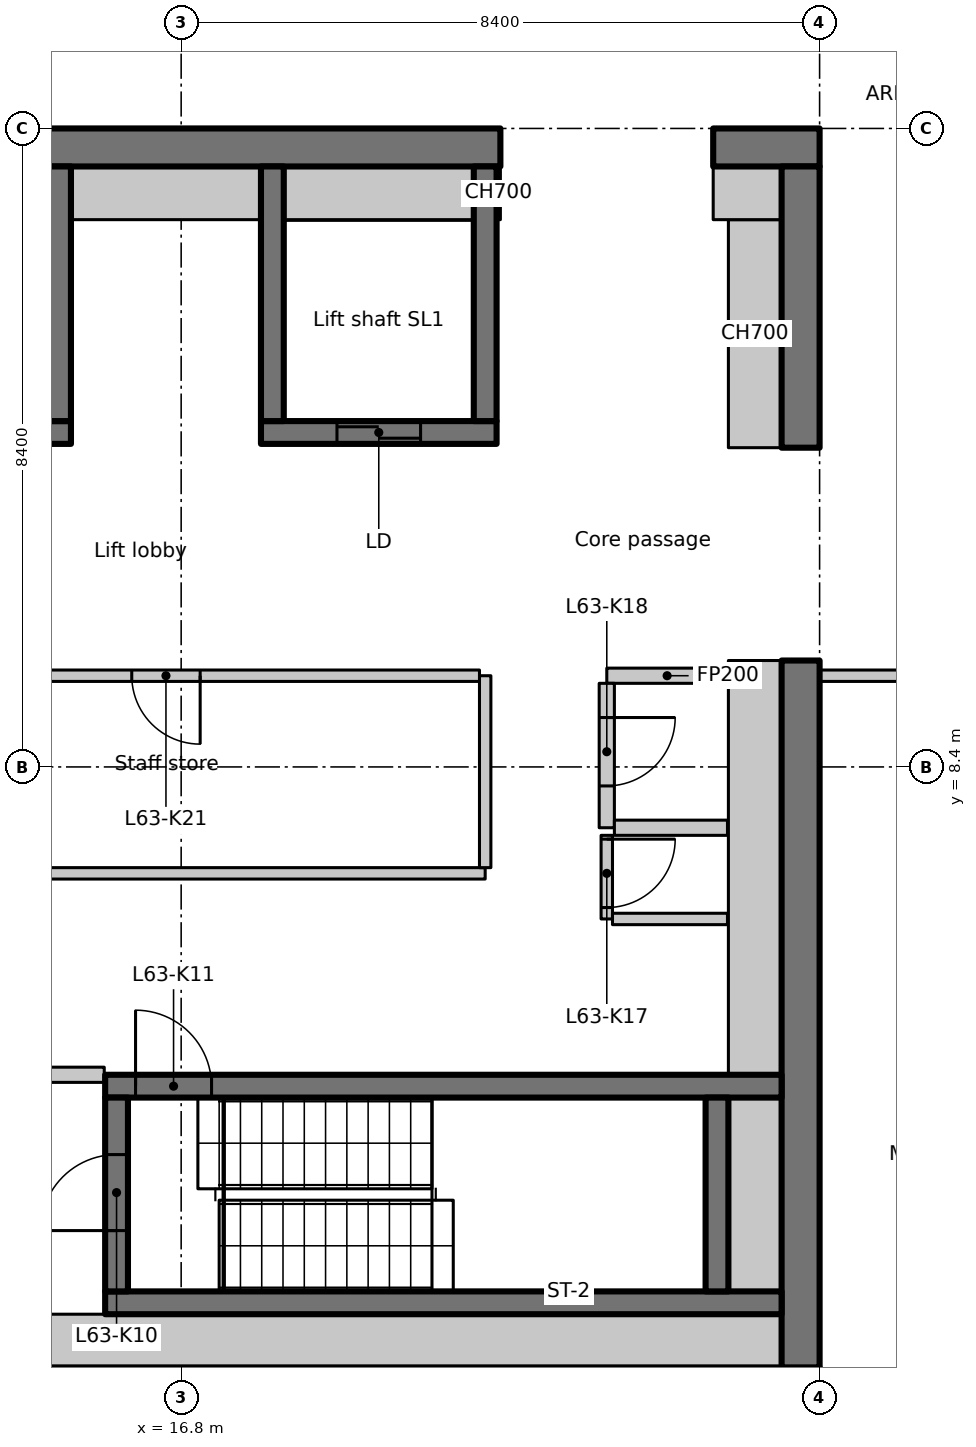
"""IFC4 building model, lengths in metres.
Left out: names, types, materials, properties, quantities, classifications, styles, units other than length and angle.
Written with IfcOpenShell. Run it as: python <this file> out.ifc"""

import sys

from ifc_helpers import new_model, si_unit, direction, frame, frame_2d, origin, place, context, subcontext, project, spatial, rectangle, extrude, element, fill, save


model = new_model("IFC4")
c1 = context("Model", 3, precision=1e-05, world=origin(), true_north=direction((0.0, 1.0)))
c2 = subcontext(c1, "Body", "Model", "MODEL_VIEW")
j1 = project(units=[si_unit("LENGTHUNIT", "METRE"), si_unit("PLANEANGLEUNIT", "RADIAN")], contexts=[c1])
p1 = place(None, origin())
s1 = spatial("IfcSite", under=j1, at=p1, CompositionType="ELEMENT")
p2 = place(p1, origin())
s2 = spatial("IfcBuilding", under=s1, at=p2, CompositionType="ELEMENT")
p3 = place(p2, frame((0.0, 0.0, 248.1)))
s3 = spatial("IfcBuildingStorey", under=s2, at=p3, CompositionType="ELEMENT", Elevation=248.1)
p4 = place(p3, frame((-1.1, 16.55, 0.0), z_axis=(0.0, 0.0, 1.0), x_axis=(1.0, 0.0, 0.0)))
e1 = element("IfcWall", 1, at=p4, inside=s3, PredefinedType="SHEAR", context=c2, shape_type="SweptSolid", body=[
    extrude(rectangle(XDim=22.1, YDim=0.5, at=frame_2d((11.05, 0.0))), origin(), (0.0, 0.0, 1.0), 3.35),
])
p5 = place(p4, frame((3.15, 0.0, 0.0)))
e2 = element("IfcOpeningElement", 2, at=p5, cuts=e1, PredefinedType="OPENING", context=c2, shape_type="SweptSolid", body=[
    extrude(rectangle(XDim=1.1, YDim=2.3, at=frame_2d((0.55, 1.15))), frame((0.0, 0.26, 0.0), z_axis=(0.0, -1.0, 0.0), x_axis=(1.0, 0.0, 0.0)), (0.0, 0.0, 1.0), 0.52),
])
p6 = place(p3, frame((23.8, 16.55, 0.0), z_axis=(0.0, 0.0, 1.0), x_axis=(1.0, 0.0, 0.0)))
e3 = element("IfcWall", 3, at=p6, inside=s3, PredefinedType="SHEAR", context=c2, shape_type="SweptSolid", body=[
    extrude(rectangle(XDim=1.4, YDim=0.5, at=frame_2d((0.7, 0.0))), origin(), (0.0, 0.0, 1.0), 3.35),
])
p7 = place(p3, frame((24.95, 0.5, 0.0), z_axis=(0.0, 0.0, 1.0), x_axis=(0.0, 1.0, 0.0)))
e4 = element("IfcWall", 4, at=p7, inside=s3, PredefinedType="SHEAR", context=c2, shape_type="SweptSolid", body=[
    extrude(rectangle(XDim=9.3, YDim=0.5, at=frame_2d((4.65, 0.0))), origin(), (0.0, 0.0, 1.0), 3.35),
])
p8 = place(p3, frame((24.95, 12.6, 0.0), z_axis=(0.0, 0.0, 1.0), x_axis=(0.0, 1.0, 0.0)))
e5 = element("IfcWall", 5, at=p8, inside=s3, PredefinedType="SHEAR", context=c2, shape_type="SweptSolid", body=[
    extrude(rectangle(XDim=3.7, YDim=0.5, at=frame_2d((1.85, 0.0))), origin(), (0.0, 0.0, 1.0), 3.35),
])
p9 = place(p3, frame((24.35, 12.6, 0.0), z_axis=(0.0, 0.0, 1.0), x_axis=(0.0, 1.0, 0.0)))
e6 = element("IfcWall", 6, at=p9, inside=s3, PredefinedType="PARTITIONING", context=c2, shape_type="SweptSolid", body=[
    extrude(rectangle(XDim=3.0, YDim=0.7, at=frame_2d((1.5, 0.0))), origin(), (0.0, 0.0, 1.0), 3.35),
])
p10 = place(p3, frame((23.8, 15.95, 0.0), z_axis=(0.0, 0.0, 1.0), x_axis=(1.0, 0.0, 0.0)))
e7 = element("IfcWall", 7, at=p10, inside=s3, PredefinedType="PARTITIONING", context=c2, shape_type="SweptSolid", body=[
    extrude(rectangle(XDim=0.9, YDim=0.7, at=frame_2d((0.45, 0.0))), origin(), (0.0, 0.0, 1.0), 3.35),
])
p11 = place(p3, frame((0.5, 12.8, 0.0), z_axis=(0.0, 0.0, 1.0), x_axis=(1.0, 0.0, 0.0)))
e8 = element("IfcWall", 8, at=p11, inside=s3, PredefinedType="SHEAR", context=c2, shape_type="SweptSolid", body=[
    extrude(rectangle(XDim=14.85, YDim=0.3, at=frame_2d((7.425, 0.0))), origin(), (0.0, 0.0, 1.0), 3.35),
])
p12 = place(p11, frame((4.35, 0.0, 0.0)))
e9 = element("IfcOpeningElement", 9, at=p12, cuts=e8, PredefinedType="OPENING", context=c2, shape_type="SweptSolid", body=[
    extrude(rectangle(XDim=1.1, YDim=2.3, at=frame_2d((0.55, 1.15))), frame((0.0, 0.16, 0.0), z_axis=(0.0, -1.0, 0.0), x_axis=(1.0, 0.0, 0.0)), (0.0, 0.0, 1.0), 0.32),
])
p13 = place(p11, frame((7.15, 0.0, 0.0)))
e10 = element("IfcOpeningElement", 10, at=p13, cuts=e8, PredefinedType="OPENING", context=c2, shape_type="SweptSolid", body=[
    extrude(rectangle(XDim=1.1, YDim=2.3, at=frame_2d((0.55, 1.15))), frame((0.0, 0.16, 0.0), z_axis=(0.0, -1.0, 0.0), x_axis=(1.0, 0.0, 0.0)), (0.0, 0.0, 1.0), 0.32),
])
p14 = place(p11, frame((9.95, 0.0, 0.0)))
e11 = element("IfcOpeningElement", 11, at=p14, cuts=e8, PredefinedType="OPENING", context=c2, shape_type="SweptSolid", body=[
    extrude(rectangle(XDim=1.1, YDim=2.3, at=frame_2d((0.55, 1.15))), frame((0.0, 0.16, 0.0), z_axis=(0.0, -1.0, 0.0), x_axis=(1.0, 0.0, 0.0)), (0.0, 0.0, 1.0), 0.32),
])
p15 = place(p11, frame((12.75, 0.0, 0.0)))
e12 = element("IfcOpeningElement", 12, at=p15, cuts=e8, PredefinedType="OPENING", context=c2, shape_type="SweptSolid", body=[
    extrude(rectangle(XDim=1.1, YDim=2.3, at=frame_2d((0.55, 1.15))), frame((0.0, 0.16, 0.0), z_axis=(0.0, -1.0, 0.0), x_axis=(1.0, 0.0, 0.0)), (0.0, 0.0, 1.0), 0.32),
])
p16 = place(p3, frame((15.2, 12.95, 0.0), z_axis=(0.0, 0.0, 1.0), x_axis=(0.0, 1.0, 0.0)))
e13 = element("IfcWall", 13, at=p16, inside=s3, PredefinedType="SHEAR", context=c2, shape_type="SweptSolid", body=[
    extrude(rectangle(XDim=3.35, YDim=0.3, at=frame_2d((1.675, 0.0))), origin(), (0.0, 0.0, 1.0), 3.35),
])
p17 = place(p3, frame((17.85, 12.8, 0.0), z_axis=(0.0, 0.0, 1.0), x_axis=(1.0, 0.0, 0.0)))
e14 = element("IfcWall", 14, at=p17, inside=s3, PredefinedType="SHEAR", context=c2, shape_type="SweptSolid", body=[
    extrude(rectangle(XDim=3.1, YDim=0.3, at=frame_2d((1.55, 0.0))), origin(), (0.0, 0.0, 1.0), 3.35),
])
p18 = place(p17, frame((1.0, 0.0, 0.0)))
e15 = element("IfcOpeningElement", 15, at=p18, cuts=e14, PredefinedType="OPENING", context=c2, shape_type="SweptSolid", body=[
    extrude(rectangle(XDim=1.1, YDim=2.3, at=frame_2d((0.55, 1.15))), frame((0.0, 0.16, 0.0), z_axis=(0.0, -1.0, 0.0), x_axis=(1.0, 0.0, 0.0)), (0.0, 0.0, 1.0), 0.32),
])
for number, where, z_axis, x_axis in (
    (16, (18.0, 12.95, 0.0), (0.0, 0.0, 1.0), (0.0, 1.0, 0.0)),
    (17, (20.8, 12.95, 0.0), (0.0, 0.0, 1.0), (0.0, 1.0, 0.0)),
):
    element("IfcWall", number, at=place(p3, frame(where, z_axis=z_axis, x_axis=x_axis)), inside=s3, PredefinedType="SHEAR", context=c2, shape_type="SweptSolid", body=[
        extrude(rectangle(XDim=3.35, YDim=0.3, at=frame_2d((1.675, 0.0))), origin(), (0.0, 0.0, 1.0), 3.35),
    ])
p19 = place(p3, frame((15.8, 1.35, 0.0), z_axis=(0.0, 0.0, 1.0), x_axis=(1.0, 0.0, 0.0)))
e18 = element("IfcWall", 18, at=p19, inside=s3, PredefinedType="SHEAR", context=c2, shape_type="SweptSolid", body=[
    extrude(rectangle(XDim=8.9, YDim=0.3, at=frame_2d((4.45, 0.0))), origin(), (0.0, 0.0, 1.0), 3.35),
])
p20 = place(p3, frame((15.8, 4.2, 0.0), z_axis=(0.0, 0.0, 1.0), x_axis=(1.0, 0.0, 0.0)))
e19 = element("IfcWall", 19, at=p20, inside=s3, PredefinedType="SHEAR", context=c2, shape_type="SweptSolid", body=[
    extrude(rectangle(XDim=8.9, YDim=0.3, at=frame_2d((4.45, 0.0))), origin(), (0.0, 0.0, 1.0), 3.35),
])
p21 = place(p20, frame((0.4, 0.0, 0.0)))
e20 = element("IfcOpeningElement", 20, at=p21, cuts=e19, PredefinedType="OPENING", context=c2, shape_type="SweptSolid", body=[
    extrude(rectangle(XDim=1.0, YDim=2.1, at=frame_2d((0.5, 1.05))), frame((0.0, 0.16, 0.0), z_axis=(0.0, -1.0, 0.0), x_axis=(1.0, 0.0, 0.0)), (0.0, 0.0, 1.0), 0.32),
])
p22 = place(p3, frame((15.95, 1.5, 0.0), z_axis=(0.0, 0.0, 1.0), x_axis=(0.0, 1.0, 0.0)))
e21 = element("IfcWall", 21, at=p22, inside=s3, PredefinedType="SHEAR", context=c2, shape_type="SweptSolid", body=[
    extrude(rectangle(XDim=2.55, YDim=0.3, at=frame_2d((1.275, 0.0))), origin(), (0.0, 0.0, 1.0), 3.35),
])
p23 = place(p22, frame((0.8, 0.0, 0.0)))
e22 = element("IfcOpeningElement", 22, at=p23, cuts=e21, PredefinedType="OPENING", context=c2, shape_type="SweptSolid", body=[
    extrude(rectangle(XDim=1.0, YDim=2.1, at=frame_2d((0.5, 1.05))), frame((0.0, 0.16, 0.0), z_axis=(0.0, -1.0, 0.0), x_axis=(1.0, 0.0, 0.0)), (0.0, 0.0, 1.0), 0.32),
])
p24 = place(p3, frame((23.85, 1.5, 0.0), z_axis=(0.0, 0.0, 1.0), x_axis=(0.0, 1.0, 0.0)))
e23 = element("IfcWall", 23, at=p24, inside=s3, PredefinedType="SHEAR", context=c2, shape_type="SweptSolid", body=[
    extrude(rectangle(XDim=2.55, YDim=0.3, at=frame_2d((1.275, 0.0))), origin(), (0.0, 0.0, 1.0), 3.35),
])
p25 = place(p3, frame((13.362, 4.35, 0.0), z_axis=(0.0, 0.0, 1.0), x_axis=(1.0, 0.0, 0.0)))
e24 = element("IfcWall", 24, at=p25, inside=s3, PredefinedType="PARTITIONING", context=c2, shape_type="SweptSolid", body=[
    extrude(rectangle(XDim=2.426, YDim=0.2, at=frame_2d((1.213, 0.0))), origin(), (0.0, 0.0, 1.0), 3.35),
])
p26 = place(p25, frame((0.638, 0.0, 0.0)))
e25 = element("IfcOpeningElement", 25, at=p26, cuts=e24, PredefinedType="OPENING", context=c2, shape_type="SweptSolid", body=[
    extrude(rectangle(XDim=1.0, YDim=2.1, at=frame_2d((0.5, 1.05))), frame((0.0, 0.11, 0.0), z_axis=(0.0, -1.0, 0.0), x_axis=(1.0, 0.0, 0.0)), (0.0, 0.0, 1.0), 0.22),
])
p27 = place(p3, frame((23.988, 9.6, 0.0), z_axis=(0.0, 0.0, 1.0), x_axis=(-1.0, 0.0, 0.0)))
e26 = element("IfcWall", 26, at=p27, inside=s3, PredefinedType="PARTITIONING", context=c2, shape_type="SweptSolid", body=[
    extrude(rectangle(XDim=1.588, YDim=0.2, at=frame_2d((0.794, 0.0))), origin(), (0.0, 0.0, 1.0), 3.35),
])
p28 = place(p3, frame((22.4, 9.5, 0.0), z_axis=(0.0, 0.0, 1.0), x_axis=(0.0, -1.0, 0.0)))
e27 = element("IfcWall", 27, at=p28, inside=s3, PredefinedType="PARTITIONING", context=c2, shape_type="SweptSolid", body=[
    extrude(rectangle(XDim=1.9, YDim=0.2, at=frame_2d((0.95, 0.0))), origin(), (0.0, 0.0, 1.0), 3.35),
])
p29 = place(p28, frame((0.45, 0.0, 0.0)))
e28 = element("IfcOpeningElement", 28, at=p29, cuts=e27, PredefinedType="OPENING", context=c2, shape_type="SweptSolid", body=[
    extrude(rectangle(XDim=0.9, YDim=2.1, at=frame_2d((0.45, 1.05))), frame((0.0, 0.11, 0.0), z_axis=(0.0, -1.0, 0.0), x_axis=(1.0, 0.0, 0.0)), (0.0, 0.0, 1.0), 0.22),
])
p30 = place(p3, frame((22.5, 7.6, 0.0), z_axis=(0.0, 0.0, 1.0), x_axis=(1.0, 0.0, 0.0)))
e29 = element("IfcWall", 29, at=p30, inside=s3, PredefinedType="PARTITIONING", context=c2, shape_type="SweptSolid", body=[
    extrude(rectangle(XDim=1.488, YDim=0.2, at=frame_2d((0.744, 0.0))), origin(), (0.0, 0.0, 1.0), 3.35),
])
p31 = place(p3, frame((12.5, 7.0, 0.0), z_axis=(0.0, 0.0, 1.0), x_axis=(1.0, 0.0, 0.0)))
e30 = element("IfcWall", 30, at=p31, inside=s3, PredefinedType="PARTITIONING", context=c2, shape_type="SweptSolid", body=[
    extrude(rectangle(XDim=8.3, YDim=0.15, at=frame_2d((4.15, 0.0))), origin(), (0.0, 0.0, 1.0), 3.35),
])
p32 = place(p3, frame((20.8, 7.075, 0.0), z_axis=(0.0, 0.0, 1.0), x_axis=(0.0, 1.0, 0.0)))
e31 = element("IfcWall", 31, at=p32, inside=s3, PredefinedType="PARTITIONING", context=c2, shape_type="SweptSolid", body=[
    extrude(rectangle(XDim=2.525, YDim=0.15, at=frame_2d((1.263, 0.0))), origin(), (0.0, 0.0, 1.0), 3.35),
])
p33 = place(p3, frame((20.725, 9.6, 0.0), z_axis=(0.0, 0.0, 1.0), x_axis=(-1.0, 0.0, 0.0)))
e32 = element("IfcWall", 32, at=p33, inside=s3, PredefinedType="PARTITIONING", context=c2, shape_type="SweptSolid", body=[
    extrude(rectangle(XDim=8.225, YDim=0.15, at=frame_2d((4.113, 0.0))), origin(), (0.0, 0.0, 1.0), 3.35),
])
p34 = place(p33, frame((3.675, 0.0, 0.0)))
e33 = element("IfcOpeningElement", 33, at=p34, cuts=e32, PredefinedType="OPENING", context=c2, shape_type="SweptSolid", body=[
    extrude(rectangle(XDim=0.9, YDim=2.1, at=frame_2d((0.45, 1.05))), frame((0.0, 0.085, 0.0), z_axis=(0.0, -1.0, 0.0), x_axis=(1.0, 0.0, 0.0)), (0.0, 0.0, 1.0), 0.17),
])
p35 = place(p3, frame((22.4, 7.5, 0.0), z_axis=(0.0, 0.0, 1.0), x_axis=(0.0, -1.0, 0.0)))
e34 = element("IfcWall", 34, at=p35, inside=s3, PredefinedType="PARTITIONING", context=c2, shape_type="SweptSolid", body=[
    extrude(rectangle(XDim=1.1, YDim=0.15, at=frame_2d((0.55, 0.0))), origin(), (0.0, 0.0, 1.0), 3.35),
])
p36 = place(p35, frame((0.05, 0.0, 0.0)))
e35 = element("IfcOpeningElement", 35, at=p36, cuts=e34, PredefinedType="OPENING", context=c2, shape_type="SweptSolid", body=[
    extrude(rectangle(XDim=0.9, YDim=2.1, at=frame_2d((0.45, 1.05))), frame((0.0, 0.085, 0.0), z_axis=(0.0, -1.0, 0.0), x_axis=(1.0, 0.0, 0.0)), (0.0, 0.0, 1.0), 0.17),
])
p37 = place(p3, frame((22.475, 6.4, 0.0), z_axis=(0.0, 0.0, 1.0), x_axis=(1.0, 0.0, 0.0)))
e36 = element("IfcWall", 36, at=p37, inside=s3, PredefinedType="PARTITIONING", context=c2, shape_type="SweptSolid", body=[
    extrude(rectangle(XDim=1.513, YDim=0.15, at=frame_2d((0.756, 0.0))), origin(), (0.0, 0.0, 1.0), 3.35),
])
for number, where, z_axis, x_axis in (
    (37, (15.35, 15.95, 0.0), (0.0, 0.0, 1.0), (1.0, 0.0, 0.0)),
    (38, (18.15, 15.95, 0.0), (0.0, 0.0, 1.0), (1.0, 0.0, 0.0)),
):
    element("IfcWall", number, at=place(p3, frame(where, z_axis=z_axis, x_axis=x_axis)), inside=s3, PredefinedType="PARTITIONING", context=c2, shape_type="SweptSolid", body=[
        extrude(rectangle(XDim=2.5, YDim=0.7, at=frame_2d((1.25, 0.0))), origin(), (0.0, 0.0, 1.0), 3.35),
    ])
p38 = place(p3, frame((20.95, 15.95, 0.0), z_axis=(0.0, 0.0, 1.0), x_axis=(1.0, 0.0, 0.0)))
e39 = element("IfcWall", 39, at=p38, inside=s3, PredefinedType="PARTITIONING", context=c2, shape_type="SweptSolid", body=[
    extrude(rectangle(XDim=0.05, YDim=0.7, at=frame_2d((0.025, 0.0))), origin(), (0.0, 0.0, 1.0), 3.35),
])
p39 = place(p3, frame((13.35, 0.85, 0.0), z_axis=(0.0, 0.0, 1.0), x_axis=(1.0, 0.0, 0.0)))
e40 = element("IfcWall", 40, at=p39, inside=s3, PredefinedType="PARTITIONING", context=c2, shape_type="SweptSolid", body=[
    extrude(rectangle(XDim=11.35, YDim=0.7, at=frame_2d((5.675, 0.0))), origin(), (0.0, 0.0, 1.0), 3.35),
])
p40 = place(p3, frame((24.35, 1.5, 0.0), z_axis=(0.0, 0.0, 1.0), x_axis=(0.0, 1.0, 0.0)))
e41 = element("IfcWall", 41, at=p40, inside=s3, PredefinedType="PARTITIONING", context=c2, shape_type="SweptSolid", body=[
    extrude(rectangle(XDim=2.55, YDim=0.7, at=frame_2d((1.275, 0.0))), origin(), (0.0, 0.0, 1.0), 3.35),
])
p41 = place(p3, frame((24.35, 4.35, 0.0), z_axis=(0.0, 0.0, 1.0), x_axis=(0.0, 1.0, 0.0)))
e42 = element("IfcWall", 42, at=p41, inside=s3, PredefinedType="PARTITIONING", context=c2, shape_type="SweptSolid", body=[
    extrude(rectangle(XDim=5.45, YDim=0.7, at=frame_2d((2.725, 0.0))), origin(), (0.0, 0.0, 1.0), 3.35),
])
p42 = place(p3, frame((29.4, 9.6, 0.0), z_axis=(0.0, 0.0, 1.0), x_axis=(-1.0, 0.0, 0.0)))
e43 = element("IfcWall", 43, at=p42, inside=s3, PredefinedType="PARTITIONING", context=c2, shape_type="SweptSolid", body=[
    extrude(rectangle(XDim=4.2, YDim=0.15, at=frame_2d((2.1, 0.0))), origin(), (0.0, 0.0, 1.0), 3.33),
])
p43 = place(p42, frame((1.5, 0.0, 0.0)))
e44 = element("IfcOpeningElement", 44, at=p43, cuts=e43, PredefinedType="OPENING", context=c2, shape_type="SweptSolid", body=[
    extrude(rectangle(XDim=1.1, YDim=2.1, at=frame_2d((0.55, 1.05))), frame((0.0, 0.085, 0.0), z_axis=(0.0, -1.0, 0.0), x_axis=(1.0, 0.0, 0.0)), (0.0, 0.0, 1.0), 0.17),
])
p44 = place(p18, origin())
e45 = element("IfcDoor", 45, at=p44, inside=s3, OperationType="SLIDING_TO_LEFT", PredefinedType="DOOR", context=c2, shape_type="SweptSolid", body=[
    extrude(rectangle(XDim=1.1, YDim=2.3, at=frame_2d((0.55, 1.15))), frame((0.0, 0.025, 0.0), z_axis=(0.0, -1.0, 0.0), x_axis=(1.0, 0.0, 0.0)), (0.0, 0.0, 1.0), 0.05),
])
fill(e15, e45)
p45 = place(p23, origin())
e46 = element("IfcDoor", 46, at=p45, inside=s3, OperationType="SINGLE_SWING_LEFT", PredefinedType="DOOR", context=c2, shape_type="SweptSolid", body=[
    extrude(rectangle(XDim=1.0, YDim=2.1, at=frame_2d((0.5, 1.05))), frame((0.0, 0.025, 0.0), z_axis=(0.0, -1.0, 0.0), x_axis=(1.0, 0.0, 0.0)), (0.0, 0.0, 1.0), 0.05),
])
fill(e22, e46)
p46 = place(p21, origin())
e47 = element("IfcDoor", 47, at=p46, inside=s3, OperationType="SINGLE_SWING_RIGHT", PredefinedType="DOOR", context=c2, shape_type="SweptSolid", body=[
    extrude(rectangle(XDim=1.0, YDim=2.1, at=frame_2d((0.5, 1.05))), frame((0.0, 0.025, 0.0), z_axis=(0.0, -1.0, 0.0), x_axis=(1.0, 0.0, 0.0)), (0.0, 0.0, 1.0), 0.05),
])
fill(e20, e47)
p47 = place(p36, origin())
e48 = element("IfcDoor", 48, at=p47, inside=s3, OperationType="SINGLE_SWING_RIGHT", PredefinedType="DOOR", context=c2, shape_type="SweptSolid", body=[
    extrude(rectangle(XDim=0.9, YDim=2.1, at=frame_2d((0.45, 1.05))), frame((0.0, 0.025, 0.0), z_axis=(0.0, -1.0, 0.0), x_axis=(1.0, 0.0, 0.0)), (0.0, 0.0, 1.0), 0.05),
])
fill(e35, e48)
p48 = place(p29, origin())
e49 = element("IfcDoor", 49, at=p48, inside=s3, OperationType="SINGLE_SWING_LEFT", PredefinedType="DOOR", context=c2, shape_type="SweptSolid", body=[
    extrude(rectangle(XDim=0.9, YDim=2.1, at=frame_2d((0.45, 1.05))), frame((0.0, 0.025, 0.0), z_axis=(0.0, -1.0, 0.0), x_axis=(1.0, 0.0, 0.0)), (0.0, 0.0, 1.0), 0.05),
])
fill(e28, e49)
p49 = place(p34, origin())
e50 = element("IfcDoor", 50, at=p49, inside=s3, OperationType="SINGLE_SWING_RIGHT", PredefinedType="DOOR", context=c2, shape_type="SweptSolid", body=[
    extrude(rectangle(XDim=0.9, YDim=2.1, at=frame_2d((0.45, 1.05))), frame((0.0, 0.025, 0.0), z_axis=(0.0, -1.0, 0.0), x_axis=(1.0, 0.0, 0.0)), (0.0, 0.0, 1.0), 0.05),
])
fill(e33, e50)
save(model, sys.argv[1])
